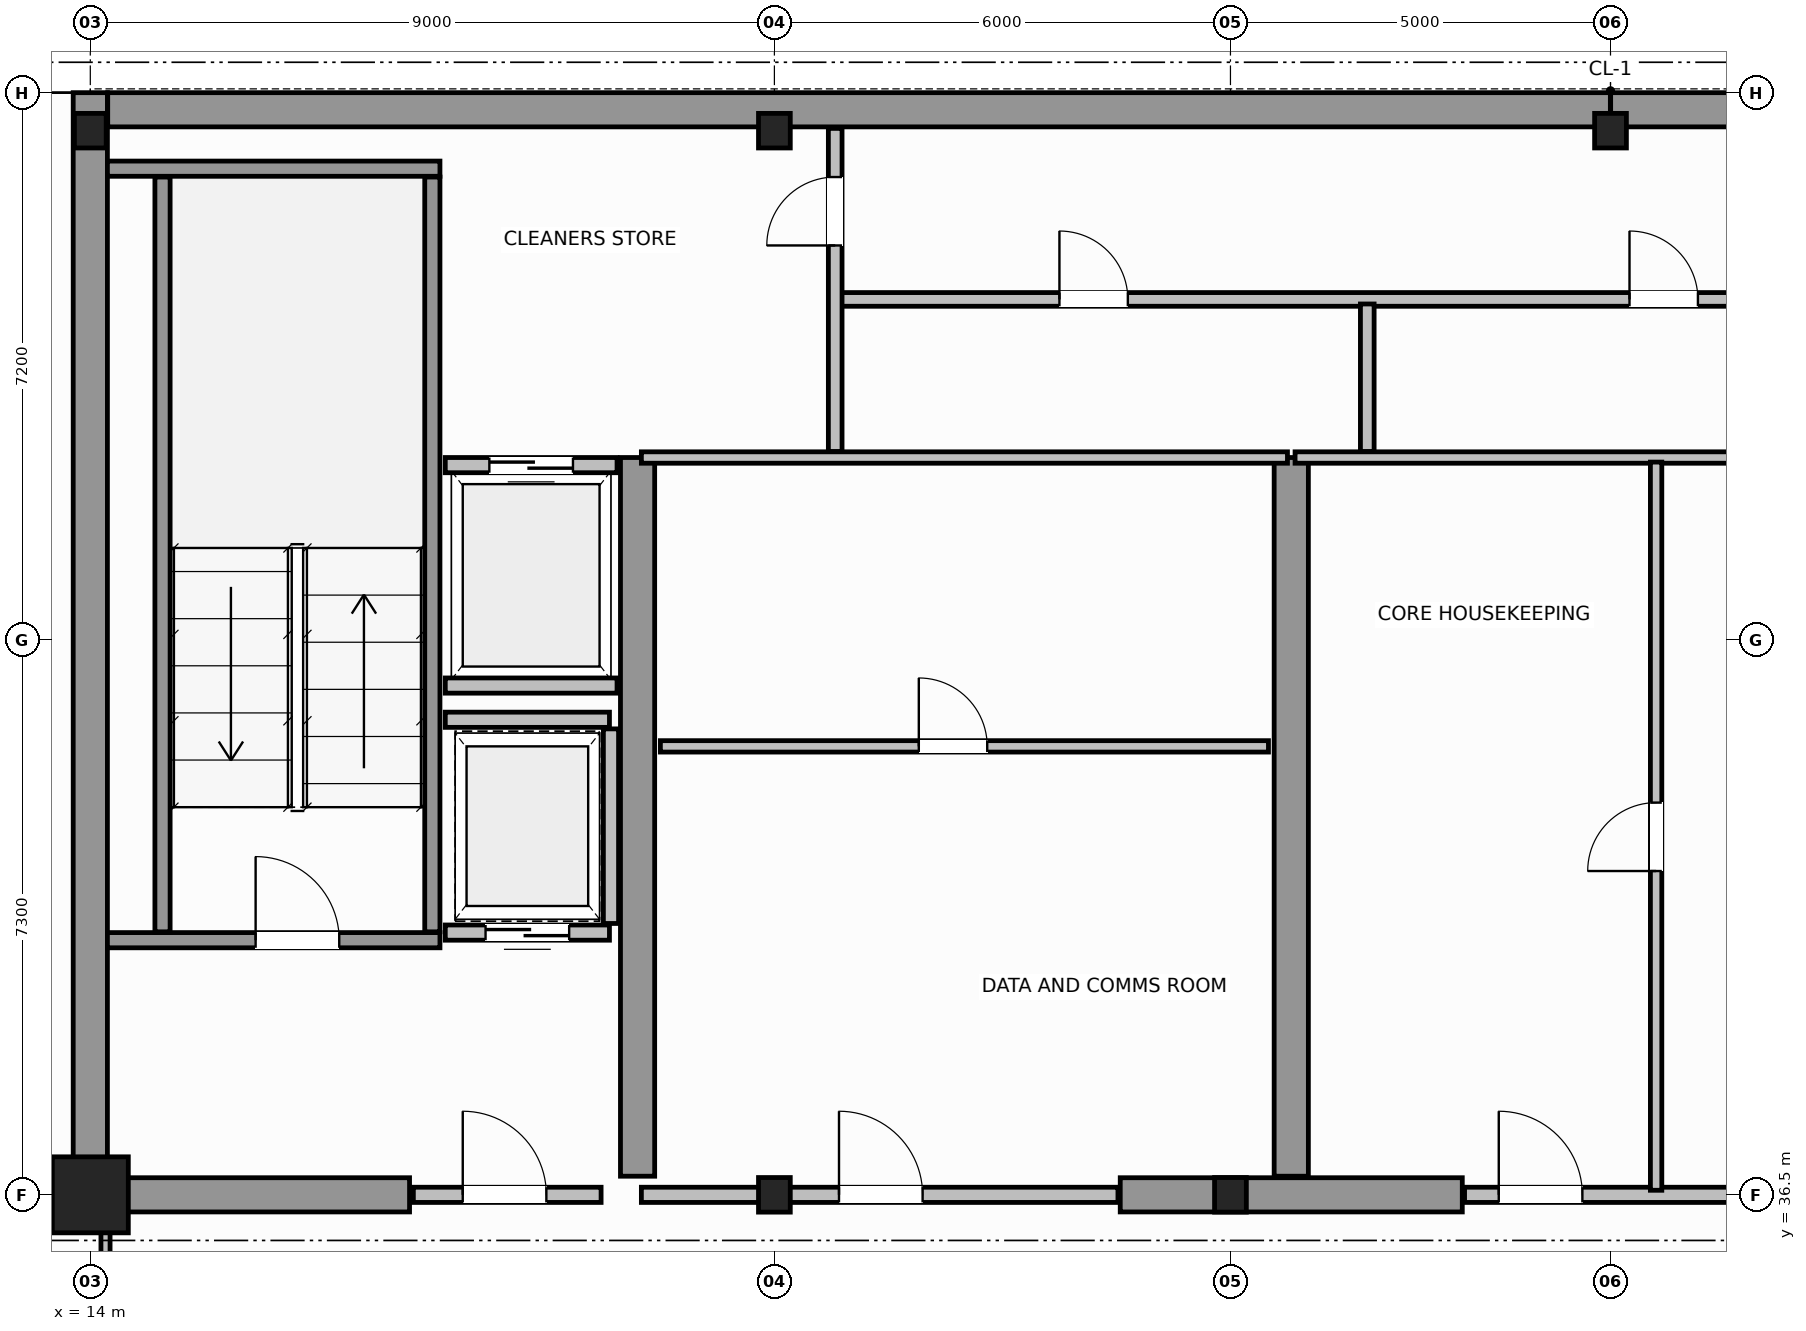
"""IFC4 building model, lengths in metres.
Left out: names, types, materials, properties, quantities, classifications, styles, units other than length and angle.
Written with IfcOpenShell. Run it as: python <this file> out.ifc"""

import sys

from ifc_helpers import new_model, si_unit, direction, frame, frame_2d, origin, origin_2d, place, context, subcontext, project, spatial, rectangle, i_section, extrude, source, transform, mapped, element, fill, save


model = new_model("IFC4")
c1 = context("Model", 3, precision=1e-05, world=origin(), true_north=direction((0.0, 1.0)))
c2 = subcontext(c1, "Body", "Model", "MODEL_VIEW")
j1 = project(units=[si_unit("LENGTHUNIT", "METRE"), si_unit("PLANEANGLEUNIT", "RADIAN")], contexts=[c1])
p1 = place(None, origin())
s1 = spatial("IfcSite", under=j1, at=p1, CompositionType="ELEMENT")
p2 = place(p1, origin())
s2 = spatial("IfcBuilding", under=s1, at=p2, CompositionType="ELEMENT")
p3 = place(p2, frame((0.0, 0.0, 246.0)))
s3 = spatial("IfcBuildingStorey", under=s2, at=p3, CompositionType="ELEMENT", Elevation=246.0)
m1 = source(origin(), c2, "Body", "SweptSolid", [
    extrude(rectangle(XDim=1.0, YDim=1.0, at=origin_2d()), origin(), (0.0, 0.0, 1.0), 3.8),
])
p4 = place(p3, frame((14.0, 36.5, 0.0), z_axis=(0.0, 0.0, 1.0), x_axis=(1.0, 0.0, 0.0)))
e1 = element("IfcColumn", 1, at=p4, inside=s3, PredefinedType="COLUMN", context=c2, shape_type="MappedRepresentation", body=[
    mapped(m1, transform((0.0, 0.0, 0.0), scale=1.0)),
])
m2 = source(origin(), c2, "Body", "SweptSolid", [
    extrude(i_section(OverallWidth=0.418, OverallDepth=0.455, WebThickness=0.042, FlangeThickness=0.058, FilletRadius=0.015, at=origin_2d()), origin(), (0.0, 0.0, 1.0), 3.8),
])
for number, where, z_axis, x_axis in (
    (2, (23.0, 36.5, 0.0), (0.0, 0.0, 1.0), (1.0, 0.0, 0.0)),
    (3, (29.0, 36.5, 0.0), (0.0, 0.0, 1.0), (1.0, 0.0, 0.0)),
    (4, (14.0, 50.5, 0.0), (0.0, 0.0, 1.0), (1.0, 0.0, 0.0)),
    (5, (23.0, 50.5, 0.0), (0.0, 0.0, 1.0), (1.0, 0.0, 0.0)),
    (6, (34.0, 50.5, 0.0), (0.0, 0.0, 1.0), (1.0, 0.0, 0.0)),
):
    element("IfcColumn", number, at=place(p3, frame(where, z_axis=z_axis, x_axis=x_axis)), inside=s3, PredefinedType="COLUMN", context=c2, shape_type="MappedRepresentation", body=[
        mapped(m2, transform((0.0, 0.0, 0.0), scale=1.0)),
    ])
for number, where, z_axis, x_axis in (
    (7, (14.229, 50.775, 0.0), (0.0, 0.0, 1.0), (1.0, 0.0, 0.0)),
    (8, (34.002, 50.775, 0.0), (0.0, 0.0, 1.0), (1.0, 0.0, 0.0)),
):
    element("IfcWall", number, at=place(p3, frame(where, z_axis=z_axis, x_axis=x_axis)), inside=s3, PredefinedType="SHEAR", context=c2, shape_type="SweptSolid", body=[
        extrude(rectangle(XDim=19.769, YDim=0.45, at=frame_2d((9.885, 0.0))), origin(), (0.0, 0.0, 1.0), 3.8),
    ])
p5 = place(p3, frame((14.0, 36.5, 0.0), z_axis=(0.0, 0.0, 1.0), x_axis=(0.0, 1.0, 0.0)))
e9 = element("IfcWall", 9, at=p5, inside=s3, PredefinedType="SHEAR", context=c2, shape_type="SweptSolid", body=[
    extrude(rectangle(XDim=14.5, YDim=0.45, at=frame_2d((7.25, 0.0))), origin(), (0.0, 0.0, 1.0), 3.8),
])
p6 = place(p3, frame((14.245, 36.5, 0.0), z_axis=(0.0, 0.0, 1.0), x_axis=(1.0, 0.0, 0.0)))
e10 = element("IfcWall", 10, at=p6, inside=s3, PredefinedType="SHEAR", context=c2, shape_type="SweptSolid", body=[
    extrude(rectangle(XDim=3.955, YDim=0.45, at=frame_2d((1.978, 0.0))), origin(), (0.0, 0.0, 1.0), 2.58),
])
p7 = place(p3, frame((27.55, 36.5, 0.0), z_axis=(0.0, 0.0, 1.0), x_axis=(1.0, 0.0, 0.0)))
e11 = element("IfcWall", 11, at=p7, inside=s3, PredefinedType="SHEAR", context=c2, shape_type="SweptSolid", body=[
    extrude(rectangle(XDim=4.5, YDim=0.45, at=frame_2d((2.25, 0.0))), origin(), (0.0, 0.0, 1.0), 3.8),
])
for number, where, z_axis, x_axis in (
    (12, (21.2, 36.745, 0.0), (0.0, 0.0, 1.0), (0.0, 1.0, 0.0)),
    (13, (29.8, 36.745, 0.0), (0.0, 0.0, 1.0), (0.0, 1.0, 0.0)),
):
    element("IfcWall", number, at=place(p3, frame(where, z_axis=z_axis, x_axis=x_axis)), inside=s3, PredefinedType="SHEAR", context=c2, shape_type="SweptSolid", body=[
        extrude(rectangle(XDim=9.455, YDim=0.45, at=frame_2d((4.728, 0.0))), origin(), (0.0, 0.0, 1.0), 3.8),
    ])
p8 = place(p3, frame((14.225, 39.85, 0.0), z_axis=(0.0, 0.0, 1.0), x_axis=(1.0, 0.0, 0.0)))
e14 = element("IfcWall", 14, at=p8, inside=s3, PredefinedType="SOLIDWALL", context=c2, shape_type="SweptSolid", body=[
    extrude(rectangle(XDim=4.375, YDim=0.2, at=frame_2d((2.188, 0.0))), origin(), (0.0, 0.0, 1.0), 3.8),
])
p9 = place(p8, frame((1.95, 0.0, 0.0)))
e15 = element("IfcOpeningElement", 15, at=p9, cuts=e14, PredefinedType="OPENING", context=c2, shape_type="SweptSolid", body=[
    extrude(rectangle(XDim=1.1, YDim=2.15, at=frame_2d((0.55, 1.075))), frame((0.0, 0.11, 0.0), z_axis=(0.0, -1.0, 0.0), x_axis=(1.0, 0.0, 0.0)), (0.0, 0.0, 1.0), 0.22),
])
p10 = place(p3, frame((14.225, 50.0, 0.0), z_axis=(0.0, 0.0, 1.0), x_axis=(1.0, 0.0, 0.0)))
e16 = element("IfcWall", 16, at=p10, inside=s3, PredefinedType="SOLIDWALL", context=c2, shape_type="SweptSolid", body=[
    extrude(rectangle(XDim=4.375, YDim=0.2, at=frame_2d((2.188, 0.0))), origin(), (0.0, 0.0, 1.0), 3.8),
])
for number, where, z_axis, x_axis in (
    (17, (14.95, 39.96, 0.0), (0.0, 0.0, 1.0), (0.0, 1.0, 0.0)),
    (18, (18.5, 39.96, 0.0), (0.0, 0.0, 1.0), (0.0, 1.0, 0.0)),
):
    element("IfcWall", number, at=place(p3, frame(where, z_axis=z_axis, x_axis=x_axis)), inside=s3, PredefinedType="SOLIDWALL", context=c2, shape_type="SweptSolid", body=[
        extrude(rectangle(XDim=9.93, YDim=0.2, at=frame_2d((4.965, 0.0))), origin(), (0.0, 0.0, 1.0), 3.8),
    ])
p11 = place(p3, frame((18.25, 36.5, 0.0), z_axis=(0.0, 0.0, 1.0), x_axis=(1.0, 0.0, 0.0)))
e19 = element("IfcWall", 19, at=p11, inside=s3, PredefinedType="SOLIDWALL", context=c2, shape_type="SweptSolid", body=[
    extrude(rectangle(XDim=2.47, YDim=0.2, at=frame_2d((1.235, 0.0))), origin(), (0.0, 0.0, 1.0), 2.57),
])
p12 = place(p11, frame((0.65, 0.0, 0.0)))
e20 = element("IfcOpeningElement", 20, at=p12, cuts=e19, PredefinedType="OPENING", context=c2, shape_type="SweptSolid", body=[
    extrude(rectangle(XDim=1.1, YDim=2.15, at=frame_2d((0.55, 1.075))), frame((0.0, 0.11, 0.0), z_axis=(0.0, -1.0, 0.0), x_axis=(1.0, 0.0, 0.0)), (0.0, 0.0, 1.0), 0.22),
])
p13 = place(p3, frame((18.67, 46.1, 0.0), z_axis=(0.0, 0.0, 1.0), x_axis=(1.0, 0.0, 0.0)))
e21 = element("IfcWall", 21, at=p13, inside=s3, PredefinedType="SOLIDWALL", context=c2, shape_type="SweptSolid", body=[
    extrude(rectangle(XDim=2.26, YDim=0.2, at=frame_2d((1.13, 0.0))), origin(), (0.0, 0.0, 1.0), 3.58),
])
p14 = place(p13, frame((0.58, 0.0, 0.0)))
e22 = element("IfcOpeningElement", 22, at=p14, cuts=e21, PredefinedType="OPENING", context=c2, shape_type="SweptSolid", body=[
    extrude(rectangle(XDim=1.1, YDim=2.15, at=frame_2d((0.55, 1.075))), frame((0.0, 0.11, 0.0), z_axis=(0.0, -1.0, 0.0), x_axis=(1.0, 0.0, 0.0)), (0.0, 0.0, 1.0), 0.22),
])
p15 = place(p3, frame((18.67, 43.2, 0.0), z_axis=(0.0, 0.0, 1.0), x_axis=(1.0, 0.0, 0.0)))
e23 = element("IfcWall", 23, at=p15, inside=s3, PredefinedType="SOLIDWALL", context=c2, shape_type="SweptSolid", body=[
    extrude(rectangle(XDim=2.26, YDim=0.2, at=frame_2d((1.13, 0.0))), origin(), (0.0, 0.0, 1.0), 3.58),
])
p16 = place(p3, frame((18.67, 39.95, 0.0), z_axis=(0.0, 0.0, 1.0), x_axis=(1.0, 0.0, 0.0)))
e24 = element("IfcWall", 24, at=p16, inside=s3, PredefinedType="SOLIDWALL", context=c2, shape_type="SweptSolid", body=[
    extrude(rectangle(XDim=2.16, YDim=0.2, at=frame_2d((1.08, 0.0))), origin(), (0.0, 0.0, 1.0), 3.58),
])
p17 = place(p16, frame((0.53, 0.0, 0.0)))
e25 = element("IfcOpeningElement", 25, at=p17, cuts=e24, PredefinedType="OPENING", context=c2, shape_type="SweptSolid", body=[
    extrude(rectangle(XDim=1.1, YDim=2.15, at=frame_2d((0.55, 1.075))), frame((0.0, 0.11, 0.0), z_axis=(0.0, -1.0, 0.0), x_axis=(1.0, 0.0, 0.0)), (0.0, 0.0, 1.0), 0.22),
])
p18 = place(p3, frame((18.67, 42.75, 0.0), z_axis=(0.0, 0.0, 1.0), x_axis=(1.0, 0.0, 0.0)))
e26 = element("IfcWall", 26, at=p18, inside=s3, PredefinedType="SOLIDWALL", context=c2, shape_type="SweptSolid", body=[
    extrude(rectangle(XDim=2.16, YDim=0.2, at=frame_2d((1.08, 0.0))), origin(), (0.0, 0.0, 1.0), 3.58),
])
p19 = place(p3, frame((20.85, 40.07, 0.0), z_axis=(0.0, 0.0, 1.0), x_axis=(0.0, 1.0, 0.0)))
e27 = element("IfcWall", 27, at=p19, inside=s3, PredefinedType="SOLIDWALL", context=c2, shape_type="SweptSolid", body=[
    extrude(rectangle(XDim=2.56, YDim=0.2, at=frame_2d((1.28, 0.0))), origin(), (0.0, 0.0, 1.0), 3.58),
])
p20 = place(p3, frame((21.25, 36.5, 0.0), z_axis=(0.0, 0.0, 1.0), x_axis=(1.0, 0.0, 0.0)))
e28 = element("IfcWall", 28, at=p20, inside=s3, PredefinedType="SOLIDWALL", context=c2, shape_type="SweptSolid", body=[
    extrude(rectangle(XDim=6.27, YDim=0.2, at=frame_2d((3.135, 0.0))), origin(), (0.0, 0.0, 1.0), 2.57),
])
p21 = place(p20, frame((2.6, 0.0, 0.0)))
e29 = element("IfcOpeningElement", 29, at=p21, cuts=e28, PredefinedType="OPENING", context=c2, shape_type="SweptSolid", body=[
    extrude(rectangle(XDim=1.1, YDim=2.15, at=frame_2d((0.55, 1.075))), frame((0.0, 0.11, 0.0), z_axis=(0.0, -1.0, 0.0), x_axis=(1.0, 0.0, 0.0)), (0.0, 0.0, 1.0), 0.22),
])
p22 = place(p3, frame((21.25, 46.2, 0.0), z_axis=(0.0, 0.0, 1.0), x_axis=(1.0, 0.0, 0.0)))
e30 = element("IfcWall", 30, at=p22, inside=s3, PredefinedType="PARTITIONING", context=c2, shape_type="SweptSolid", body=[
    extrude(rectangle(XDim=8.5, YDim=0.15, at=frame_2d((4.25, 0.0))), origin(), (0.0, 0.0, 1.0), 3.58),
])
p23 = place(p3, frame((21.5, 42.4, 0.0), z_axis=(0.0, 0.0, 1.0), x_axis=(1.0, 0.0, 0.0)))
e31 = element("IfcWall", 31, at=p23, inside=s3, PredefinedType="PARTITIONING", context=c2, shape_type="SweptSolid", body=[
    extrude(rectangle(XDim=8.0, YDim=0.15, at=frame_2d((4.0, 0.0))), origin(), (0.0, 0.0, 1.0), 3.58),
])
p24 = place(p23, frame((3.4, 0.0, 0.0)))
e32 = element("IfcOpeningElement", 32, at=p24, cuts=e31, PredefinedType="OPENING", context=c2, shape_type="SweptSolid", body=[
    extrude(rectangle(XDim=0.9, YDim=2.1, at=frame_2d((0.45, 1.05))), frame((0.0, 0.085, 0.0), z_axis=(0.0, -1.0, 0.0), x_axis=(1.0, 0.0, 0.0)), (0.0, 0.0, 1.0), 0.17),
])
p25 = place(p3, frame((32.08, 36.5, 0.0), z_axis=(0.0, 0.0, 1.0), x_axis=(1.0, 0.0, 0.0)))
e33 = element("IfcWall", 33, at=p25, inside=s3, PredefinedType="SOLIDWALL", context=c2, shape_type="SweptSolid", body=[
    extrude(rectangle(XDim=4.04, YDim=0.2, at=frame_2d((2.02, 0.0))), origin(), (0.0, 0.0, 1.0), 3.02),
])
p26 = place(p25, frame((0.45, 0.0, 0.0)))
e34 = element("IfcOpeningElement", 34, at=p26, cuts=e33, PredefinedType="OPENING", context=c2, shape_type="SweptSolid", body=[
    extrude(rectangle(XDim=1.1, YDim=2.15, at=frame_2d((0.55, 1.075))), frame((0.0, 0.11, 0.0), z_axis=(0.0, -1.0, 0.0), x_axis=(1.0, 0.0, 0.0)), (0.0, 0.0, 1.0), 0.22),
])
p27 = place(p3, frame((29.85, 46.2, 0.0), z_axis=(0.0, 0.0, 1.0), x_axis=(1.0, 0.0, 0.0)))
e35 = element("IfcWall", 35, at=p27, inside=s3, PredefinedType="PARTITIONING", context=c2, shape_type="SweptSolid", body=[
    extrude(rectangle(XDim=8.5, YDim=0.15, at=frame_2d((4.25, 0.0))), origin(), (0.0, 0.0, 1.0), 3.58),
])
p28 = place(p3, frame((34.6, 36.56, 0.0), z_axis=(0.0, 0.0, 1.0), x_axis=(0.0, 1.0, 0.0)))
e36 = element("IfcWall", 36, at=p28, inside=s3, PredefinedType="PARTITIONING", context=c2, shape_type="SweptSolid", body=[
    extrude(rectangle(XDim=9.58, YDim=0.15, at=frame_2d((4.79, 0.0))), origin(), (0.0, 0.0, 1.0), 3.58),
])
p29 = place(p28, frame((4.2, 0.0, 0.0)))
e37 = element("IfcOpeningElement", 37, at=p29, cuts=e36, PredefinedType="OPENING", context=c2, shape_type="SweptSolid", body=[
    extrude(rectangle(XDim=0.9, YDim=2.1, at=frame_2d((0.45, 1.05))), frame((0.0, 0.085, 0.0), z_axis=(0.0, -1.0, 0.0), x_axis=(1.0, 0.0, 0.0)), (0.0, 0.0, 1.0), 0.17),
])
p30 = place(p3, frame((23.85, 48.28, 0.0), z_axis=(0.0, 0.0, 1.0), x_axis=(1.0, 0.0, 0.0)))
e38 = element("IfcWall", 38, at=p30, inside=s3, PredefinedType="PLUMBINGWALL", context=c2, shape_type="SweptSolid", body=[
    extrude(rectangle(XDim=15.03, YDim=0.18, at=frame_2d((7.515, 0.0))), origin(), (0.0, 0.0, 1.0), 3.58),
])
p31 = place(p30, frame((2.9, 0.0, 0.0)))
e39 = element("IfcOpeningElement", 39, at=p31, cuts=e38, PredefinedType="OPENING", context=c2, shape_type="SweptSolid", body=[
    extrude(rectangle(XDim=0.9, YDim=2.15, at=frame_2d((0.45, 1.075))), frame((0.0, 0.1, 0.0), z_axis=(0.0, -1.0, 0.0), x_axis=(1.0, 0.0, 0.0)), (0.0, 0.0, 1.0), 0.2),
])
p32 = place(p30, frame((10.4, 0.0, 0.0)))
e40 = element("IfcOpeningElement", 40, at=p32, cuts=e38, PredefinedType="OPENING", context=c2, shape_type="SweptSolid", body=[
    extrude(rectangle(XDim=0.9, YDim=2.15, at=frame_2d((0.45, 1.075))), frame((0.0, 0.1, 0.0), z_axis=(0.0, -1.0, 0.0), x_axis=(1.0, 0.0, 0.0)), (0.0, 0.0, 1.0), 0.2),
])
p33 = place(p3, frame((23.8, 46.28, 0.0), z_axis=(0.0, 0.0, 1.0), x_axis=(0.0, 1.0, 0.0)))
e41 = element("IfcWall", 41, at=p33, inside=s3, PredefinedType="PLUMBINGWALL", context=c2, shape_type="SweptSolid", body=[
    extrude(rectangle(XDim=4.25, YDim=0.18, at=frame_2d((2.125, 0.0))), origin(), (0.0, 0.0, 1.0), 3.58),
])
p34 = place(p33, frame((2.71, 0.0, 0.0)))
e42 = element("IfcOpeningElement", 42, at=p34, cuts=e41, PredefinedType="OPENING", context=c2, shape_type="SweptSolid", body=[
    extrude(rectangle(XDim=0.9, YDim=2.15, at=frame_2d((0.45, 1.075))), frame((0.0, 0.1, 0.0), z_axis=(0.0, -1.0, 0.0), x_axis=(1.0, 0.0, 0.0)), (0.0, 0.0, 1.0), 0.2),
])
p35 = place(p3, frame((30.8, 46.28, 0.0), z_axis=(0.0, 0.0, 1.0), x_axis=(0.0, 1.0, 0.0)))
e43 = element("IfcWall", 43, at=p35, inside=s3, PredefinedType="PLUMBINGWALL", context=c2, shape_type="SweptSolid", body=[
    extrude(rectangle(XDim=1.94, YDim=0.18, at=frame_2d((0.97, 0.0))), origin(), (0.0, 0.0, 1.0), 3.58),
])
p36 = place(p3, frame((14.2, 34.0, 0.0), z_axis=(0.0, 0.0, 1.0), x_axis=(0.0, 1.0, 0.0)))
e44 = element("IfcWall", 44, at=p36, inside=s3, PredefinedType="PARTITIONING", context=c2, shape_type="SweptSolid", body=[
    extrude(rectangle(XDim=2.44, YDim=0.12, at=frame_2d((1.22, 0.0))), origin(), (0.0, 0.0, 1.0), 3.58),
])
p37 = place(p36, frame((0.7, 0.0, 0.0)))
e45 = element("IfcOpeningElement", 45, at=p37, cuts=e44, PredefinedType="OPENING", context=c2, shape_type="SweptSolid", body=[
    extrude(rectangle(XDim=0.9, YDim=2.15, at=frame_2d((0.45, 1.075))), frame((0.0, 0.07, 0.0), z_axis=(0.0, -1.0, 0.0), x_axis=(1.0, 0.0, 0.0)), (0.0, 0.0, 1.0), 0.14),
])
m3 = source(origin(), c2, "Body", "SweptSolid", [
    extrude(rectangle(XDim=1.1, YDim=2.15, at=frame_2d((0.55, 1.075))), frame((0.0, 0.025, 0.0), z_axis=(0.0, -1.0, 0.0), x_axis=(1.0, 0.0, 0.0)), (0.0, 0.0, 1.0), 0.05),
])
p38 = place(p9, origin())
e46 = element("IfcDoor", 46, at=p38, inside=s3, OperationType="SINGLE_SWING_LEFT", PredefinedType="DOOR", context=c2, shape_type="MappedRepresentation", body=[
    mapped(m3, transform((0.0, 0.0, 0.0), scale=1.0)),
])
fill(e15, e46)
p39 = place(p12, origin())
e47 = element("IfcDoor", 47, at=p39, inside=s3, OperationType="SINGLE_SWING_RIGHT", PredefinedType="DOOR", context=c2, shape_type="MappedRepresentation", body=[
    mapped(m3, transform((0.0, 0.0, 0.0), scale=1.0)),
])
fill(e20, e47)
p40 = place(p14, origin())
e48 = element("IfcDoor", 48, at=p40, inside=s3, OperationType="DOUBLE_DOOR_SLIDING", PredefinedType="DOOR", context=c2, shape_type="MappedRepresentation", body=[
    mapped(m3, transform((0.0, 0.0, 0.0), scale=1.0)),
])
fill(e22, e48)
p41 = place(p17, origin())
e49 = element("IfcDoor", 49, at=p41, inside=s3, OperationType="DOUBLE_DOOR_SLIDING", PredefinedType="DOOR", context=c2, shape_type="MappedRepresentation", body=[
    mapped(m3, transform((0.0, 0.0, 0.0), scale=1.0)),
])
fill(e25, e49)
p42 = place(p21, origin())
e50 = element("IfcDoor", 50, at=p42, inside=s3, OperationType="SINGLE_SWING_LEFT", PredefinedType="DOOR", context=c2, shape_type="MappedRepresentation", body=[
    mapped(m3, transform((0.0, 0.0, 0.0), scale=1.0)),
])
fill(e29, e50)
m4 = source(origin(), c2, "Body", "SweptSolid", [
    extrude(rectangle(XDim=0.9, YDim=2.1, at=frame_2d((0.45, 1.05))), frame((0.0, 0.025, 0.0), z_axis=(0.0, -1.0, 0.0), x_axis=(1.0, 0.0, 0.0)), (0.0, 0.0, 1.0), 0.05),
])
p43 = place(p24, origin())
e51 = element("IfcDoor", 51, at=p43, inside=s3, OperationType="SINGLE_SWING_RIGHT", PredefinedType="DOOR", context=c2, shape_type="MappedRepresentation", body=[
    mapped(m4, transform((0.0, 0.0, 0.0), scale=1.0)),
])
fill(e32, e51)
p44 = place(p26, origin())
e52 = element("IfcDoor", 52, at=p44, inside=s3, OperationType="SINGLE_SWING_LEFT", PredefinedType="DOOR", context=c2, shape_type="MappedRepresentation", body=[
    mapped(m3, transform((0.0, 0.0, 0.0), scale=1.0)),
])
fill(e34, e52)
p45 = place(p29, origin())
e53 = element("IfcDoor", 53, at=p45, inside=s3, OperationType="SINGLE_SWING_RIGHT", PredefinedType="DOOR", context=c2, shape_type="MappedRepresentation", body=[
    mapped(m4, transform((0.0, 0.0, 0.0), scale=1.0)),
])
fill(e37, e53)
m5 = source(origin(), c2, "Body", "SweptSolid", [
    extrude(rectangle(XDim=0.9, YDim=2.15, at=frame_2d((0.45, 1.075))), frame((0.0, 0.025, 0.0), z_axis=(0.0, -1.0, 0.0), x_axis=(1.0, 0.0, 0.0)), (0.0, 0.0, 1.0), 0.05),
])
p46 = place(p34, origin())
e54 = element("IfcDoor", 54, at=p46, inside=s3, OperationType="SINGLE_SWING_LEFT", PredefinedType="DOOR", context=c2, shape_type="MappedRepresentation", body=[
    mapped(m5, transform((0.0, 0.0, 0.0), scale=1.0)),
])
fill(e42, e54)
p47 = place(p31, origin())
e55 = element("IfcDoor", 55, at=p47, inside=s3, OperationType="SINGLE_SWING_RIGHT", PredefinedType="DOOR", context=c2, shape_type="MappedRepresentation", body=[
    mapped(m5, transform((0.0, 0.0, 0.0), scale=1.0)),
])
fill(e39, e55)
p48 = place(p32, origin())
e56 = element("IfcDoor", 56, at=p48, inside=s3, OperationType="SINGLE_SWING_LEFT", PredefinedType="DOOR", context=c2, shape_type="MappedRepresentation", body=[
    mapped(m5, transform((0.0, 0.0, 0.0), scale=1.0)),
])
fill(e40, e56)
save(model, sys.argv[1])
